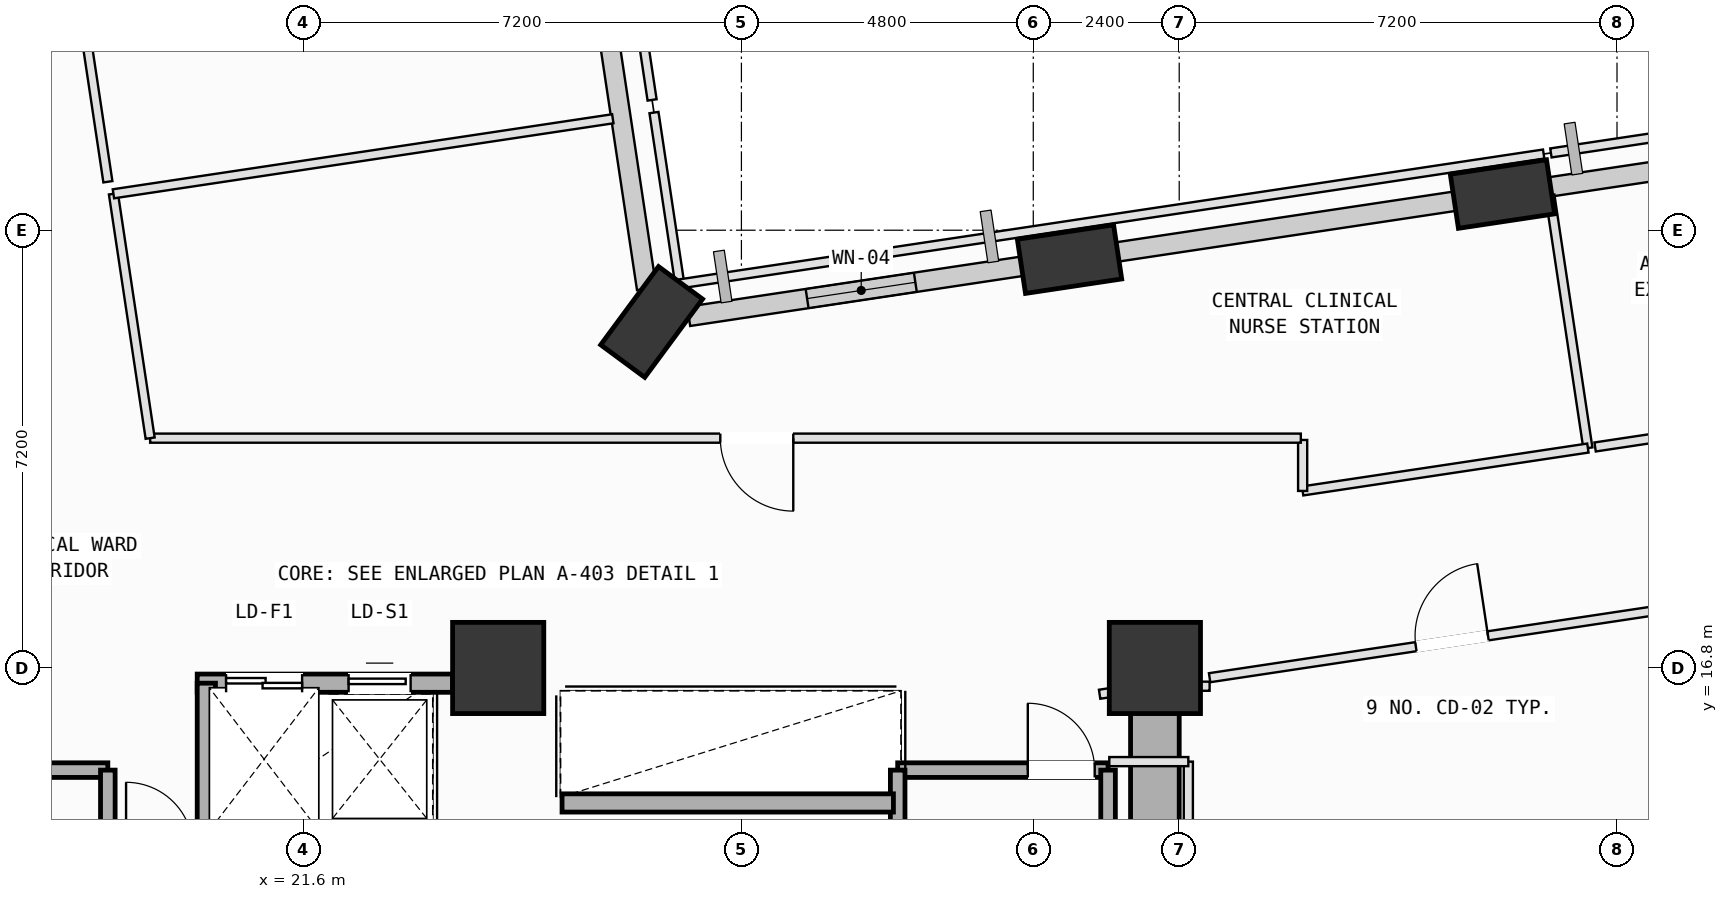
"""IFC4 building model, lengths in metres.
Left out: names, types, materials, properties, quantities, classifications, styles, units other than length and angle.
Written with IfcOpenShell. Run it as: python <this file> out.ifc"""

import sys

from ifc_helpers import new_model, si_unit, direction, frame, frame_2d, origin, origin_2d, place, context, subcontext, project, spatial, rectangle, extrude, element, fill, save


model = new_model("IFC4")
c1 = context("Model", 3, precision=1e-05, world=origin(), true_north=direction((0.0, 1.0)))
c2 = subcontext(c1, "Body", "Model", "MODEL_VIEW")
j1 = project(units=[si_unit("LENGTHUNIT", "METRE"), si_unit("PLANEANGLEUNIT", "RADIAN")], contexts=[c1])
p1 = place(None, origin())
s1 = spatial("IfcSite", under=j1, at=p1, CompositionType="ELEMENT")
p2 = place(p1, origin())
s2 = spatial("IfcBuilding", under=s1, at=p2, CompositionType="ELEMENT")
p3 = place(p2, frame((0.0, 0.0, 59.0)))
s3 = spatial("IfcBuildingStorey", under=s2, at=p3, CompositionType="ELEMENT", Elevation=59.0)
for number, where, z_axis, x_axis in (
    (1, (24.8, 16.8, 0.0), (0.0, 0.0, 1.0), (1.0, 0.0, 0.0)),
    (2, (35.6, 16.8, 0.0), (0.0, 0.0, 1.0), (1.0, 0.0, 0.0)),
):
    element("IfcColumn", number, at=place(p3, frame(where, z_axis=z_axis, x_axis=x_axis)), inside=s3, PredefinedType="COLUMN", context=c2, shape_type="SweptSolid", body=[
        extrude(rectangle(XDim=1.5, YDim=1.5, at=origin_2d()), origin(), (0.0, 0.0, 1.0), 4.0),
    ])
p4 = place(p3, frame((41.316, 24.595, 0.002), z_axis=(0.000610560717, 0.031993381587, 0.999487894249), x_axis=(-0.991541763684, -0.129700801912, 0.00475739999)))
e3 = element("IfcColumn", 3, at=p4, inside=s3, PredefinedType="COLUMN", context=c2, shape_type="SweptSolid", body=[
    extrude(rectangle(XDim=1.6, YDim=0.9, at=origin_2d()), origin(), (0.0, 0.0, 1.0), 3.999),
])
p5 = place(p3, frame((34.196, 23.524, 0.002), z_axis=(0.005253423551, 0.002504539135, 0.999983064269), x_axis=(-0.559757709656, 0.828655874178, 0.000865257922)))
e4 = element("IfcColumn", 4, at=p5, inside=s3, PredefinedType="COLUMN", context=c2, shape_type="SweptSolid", body=[
    extrude(rectangle(XDim=1.6, YDim=0.9, at=origin_2d()), origin(), (0.0, 0.0, 1.0), 3.997),
])
p6 = place(p3, frame((27.323, 22.491, 0.002), z_axis=(0.009770218113, -0.025952141862, 0.999615440642), x_axis=(0.272727110084, 0.961832825284, 0.022305596404)))
e5 = element("IfcColumn", 5, at=p6, inside=s3, PredefinedType="COLUMN", context=c2, shape_type="SweptSolid", body=[
    extrude(rectangle(XDim=1.6, YDim=0.9, at=origin_2d()), origin(), (0.0, 0.0, 1.0), 3.998),
])
p7 = place(p3, frame((41.925, 24.686, 0.0), z_axis=(0.0, 0.0, 1.0), x_axis=(0.988883458741, 0.148692652905, 0.0)))
e6 = element("IfcWall", 6, at=p7, inside=s3, PredefinedType="SOLIDWALL", context=c2, shape_type="SweptSolid", body=[
    extrude(rectangle(XDim=6.0, YDim=0.32, at=frame_2d((3.0, 0.0))), origin(), (0.0, 0.0, 1.0), 3.165),
])
p8 = place(p7, frame((2.238, 0.0, 0.75)))
e7 = element("IfcOpeningElement", 7, at=p8, cuts=e6, PredefinedType="OPENING", context=c2, shape_type="SweptSolid", body=[
    extrude(rectangle(XDim=2.0, YDim=1.95, at=frame_2d((1.0, 0.975))), frame((0.0, 0.17, 0.0), z_axis=(0.0, -1.0, 0.0), x_axis=(1.0, 0.0, 0.0)), (0.0, 0.0, 1.0), 0.34),
])
p9 = place(p3, frame((34.808, 23.616, 0.0), z_axis=(0.0, 0.0, 1.0), x_axis=(0.988886347304, 0.148673441189, 0.0)))
e8 = element("IfcWall", 8, at=p9, inside=s3, PredefinedType="SOLIDWALL", context=c2, shape_type="SweptSolid", body=[
    extrude(rectangle(XDim=5.987, YDim=0.32, at=frame_2d((2.994, 0.0))), origin(), (0.0, 0.0, 1.0), 3.165),
])
p10 = place(p3, frame((27.934, 22.583, 0.0), z_axis=(0.0, 0.0, 1.0), x_axis=(0.988887912661, 0.148663029005, 0.0)))
e9 = element("IfcWall", 9, at=p10, inside=s3, PredefinedType="SOLIDWALL", context=c2, shape_type="SweptSolid", body=[
    extrude(rectangle(XDim=5.736, YDim=0.32, at=frame_2d((2.868, 0.0))), origin(), (0.0, 0.0, 1.0), 3.165),
])
p11 = place(p10, frame((1.969, 0.0, 0.75)))
e10 = element("IfcOpeningElement", 10, at=p11, cuts=e9, PredefinedType="OPENING", context=c2, shape_type="SweptSolid", body=[
    extrude(rectangle(XDim=1.8, YDim=2.05, at=frame_2d((0.9, 1.025))), frame((0.0, 0.17, 0.0), z_axis=(0.0, -1.0, 0.0), x_axis=(1.0, 0.0, 0.0)), (0.0, 0.0, 1.0), 0.34),
])
p12 = place(p3, frame((27.241, 23.039, 0.0), z_axis=(0.0, 0.0, 1.0), x_axis=(-0.148660081435, 0.988888355775, 0.0)))
e11 = element("IfcWall", 11, at=p12, inside=s3, PredefinedType="SOLIDWALL", context=c2, shape_type="SweptSolid", body=[
    extrude(rectangle(XDim=6.536, YDim=0.32, at=frame_2d((3.268, 0.0))), origin(), (0.0, 0.0, 1.0), 3.165),
])
p13 = place(p3, frame((14.92, 15.12, 0.0), z_axis=(0.0, 0.0, 1.0), x_axis=(1.0, 0.0, 0.0)))
e12 = element("IfcWall", 12, at=p13, inside=s3, PredefinedType="SOLIDWALL", context=c2, shape_type="SweptSolid", body=[
    extrude(rectangle(XDim=3.46, YDim=0.24, at=frame_2d((1.73, 0.0))), origin(), (0.0, 0.0, 1.0), 3.78),
])
p14 = place(p13, frame((0.22, 0.0, 0.0)))
e13 = element("IfcOpeningElement", 13, at=p14, cuts=e12, PredefinedType="OPENING", context=c2, shape_type="SweptSolid", body=[
    extrude(rectangle(XDim=1.1, YDim=2.15, at=frame_2d((0.55, 1.075))), frame((0.0, 0.13, 0.0), z_axis=(0.0, -1.0, 0.0), x_axis=(1.0, 0.0, 0.0)), (0.0, 0.0, 1.0), 0.26),
])
p15 = place(p3, frame((18.38, 15.12, 0.0), z_axis=(0.0, 0.0, 1.0), x_axis=(0.0, -1.0, 0.0)))
e14 = element("IfcWall", 14, at=p15, inside=s3, PredefinedType="SOLIDWALL", context=c2, shape_type="SweptSolid", body=[
    extrude(rectangle(XDim=6.92, YDim=0.24, at=frame_2d((3.46, 0.0))), origin(), (0.0, 0.0, 1.0), 3.78),
])
p16 = place(p3, frame((31.37, 15.12, 0.0), z_axis=(0.0, 0.0, 1.0), x_axis=(1.0, 0.0, 0.0)))
e15 = element("IfcWall", 15, at=p16, inside=s3, PredefinedType="SOLIDWALL", context=c2, shape_type="SweptSolid", body=[
    extrude(rectangle(XDim=3.46, YDim=0.24, at=frame_2d((1.73, 0.0))), origin(), (0.0, 0.0, 1.0), 3.78),
])
p17 = place(p16, frame((2.14, 0.0, 0.0)))
e16 = element("IfcOpeningElement", 16, at=p17, cuts=e15, PredefinedType="OPENING", context=c2, shape_type="SweptSolid", body=[
    extrude(rectangle(XDim=1.1, YDim=2.15, at=frame_2d((0.55, 1.075))), frame((0.0, 0.13, 0.0), z_axis=(0.0, -1.0, 0.0), x_axis=(1.0, 0.0, 0.0)), (0.0, 0.0, 1.0), 0.26),
])
for number, where, z_axis, x_axis in (
    (17, (34.83, 15.12, 0.0), (0.0, 0.0, 1.0), (0.0, -1.0, 0.0)),
    (18, (31.37, 8.2, 0.0), (0.0, 0.0, 1.0), (0.0, 1.0, 0.0)),
):
    element("IfcWall", number, at=place(p3, frame(where, z_axis=z_axis, x_axis=x_axis)), inside=s3, PredefinedType="SOLIDWALL", context=c2, shape_type="SweptSolid", body=[
        extrude(rectangle(XDim=6.92, YDim=0.24, at=frame_2d((3.46, 0.0))), origin(), (0.0, 0.0, 1.0), 3.78),
    ])
p18 = place(p3, frame((35.6, 7.8, 0.0), z_axis=(0.0, 0.0, 1.0), x_axis=(0.0, 1.0, 0.0)))
e19 = element("IfcWall", 19, at=p18, inside=s3, PredefinedType="SHEAR", context=c2, shape_type="SweptSolid", body=[
    extrude(rectangle(XDim=9.0, YDim=0.8, at=frame_2d((4.5, 0.0))), origin(), (0.0, 0.0, 1.0), 3.78),
])
p19 = place(p3, frame((19.85, 16.55, 0.0), z_axis=(0.0, 0.0, 1.0), x_axis=(1.0, 0.0, 0.0)))
e20 = element("IfcWall", 20, at=p19, inside=s3, PredefinedType="SOLIDWALL", context=c2, shape_type="SweptSolid", body=[
    extrude(rectangle(XDim=4.2, YDim=0.3, at=frame_2d((2.1, 0.0))), origin(), (0.0, 0.0, 1.0), 3.78),
])
p20 = place(p19, frame((0.475, 0.0, 0.0)))
e21 = element("IfcOpeningElement", 21, at=p20, cuts=e20, PredefinedType="OPENING", context=c2, shape_type="SweptSolid", body=[
    extrude(rectangle(XDim=1.25, YDim=2.18, at=frame_2d((0.625, 1.09))), frame((0.0, 0.16, 0.0), z_axis=(0.0, -1.0, 0.0), x_axis=(1.0, 0.0, 0.0)), (0.0, 0.0, 1.0), 0.32),
])
p21 = place(p19, frame((2.49, 0.0, 0.0)))
e22 = element("IfcOpeningElement", 22, at=p21, cuts=e20, PredefinedType="OPENING", context=c2, shape_type="SweptSolid", body=[
    extrude(rectangle(XDim=1.02, YDim=2.12, at=frame_2d((0.51, 1.06))), frame((0.0, 0.16, 0.0), z_axis=(0.0, -1.0, 0.0), x_axis=(1.0, 0.0, 0.0)), (0.0, 0.0, 1.0), 0.32),
])
p22 = place(p3, frame((20.0, 13.82, 0.0), z_axis=(0.0, 0.0, 1.0), x_axis=(0.0, 1.0, 0.0)))
e23 = element("IfcWall", 23, at=p22, inside=s3, PredefinedType="SOLIDWALL", context=c2, shape_type="SweptSolid", body=[
    extrude(rectangle(XDim=2.73, YDim=0.3, at=frame_2d((1.365, 0.0))), origin(), (0.0, 0.0, 1.0), 3.78),
])
p23 = place(p3, frame((25.85, 14.58, 0.0), z_axis=(0.0, 0.0, 1.0), x_axis=(1.0, 0.0, 0.0)))
e24 = element("IfcWall", 24, at=p23, inside=s3, PredefinedType="SOLIDWALL", context=c2, shape_type="SweptSolid", body=[
    extrude(rectangle(XDim=5.45, YDim=0.3, at=frame_2d((2.725, 0.0))), origin(), (0.0, 0.0, 1.0), 3.78),
])
p24 = place(p3, frame((36.15, 7.5, 0.0), z_axis=(0.0, 0.0, 1.0), x_axis=(0.0, 1.0, 0.0)))
e25 = element("IfcWall", 25, at=p24, inside=s3, PredefinedType="PARTITIONING", context=c2, shape_type="SweptSolid", body=[
    extrude(rectangle(XDim=7.76, YDim=0.15, at=frame_2d((3.88, 0.0))), origin(), (0.0, 0.0, 1.0), 3.78),
])
p25 = place(p3, frame((36.15, 15.26, 0.0), z_axis=(0.0, 0.0, 1.0), x_axis=(-1.0, 0.0, 0.0)))
e26 = element("IfcWall", 26, at=p25, inside=s3, PredefinedType="PARTITIONING", context=c2, shape_type="SweptSolid", body=[
    extrude(rectangle(XDim=1.3, YDim=0.15, at=frame_2d((0.65, 0.0))), origin(), (0.0, 0.0, 1.0), 3.78),
])
p26 = place(p3, frame((34.691, 16.368, 0.0), z_axis=(0.0, 0.0, 1.0), x_axis=(0.988798318439, 0.149257781885, 0.0)))
e27 = element("IfcWall", 27, at=p26, inside=s3, PredefinedType="PARTITIONING", context=c2, shape_type="SweptSolid", body=[
    extrude(rectangle(XDim=0.885, YDim=0.15, at=frame_2d((0.442, 0.0))), origin(), (0.0, 0.0, 1.0), 2.865),
])
p27 = place(p3, frame((35.566, 16.5, 0.0), z_axis=(0.0, 0.0, 1.0), x_axis=(1.0, 0.0, 0.0)))
e28 = element("IfcWall", 28, at=p27, inside=s3, PredefinedType="PARTITIONING", context=c2, shape_type="SweptSolid", body=[
    extrude(rectangle(XDim=0.934, YDim=0.15, at=frame_2d((0.467, 0.0))), origin(), (0.0, 0.0, 1.0), 2.865),
])
p28 = place(p3, frame((36.5, 16.64, 0.0), z_axis=(0.0, 0.0, 1.0), x_axis=(0.988871164491, 0.148774393089, 0.0)))
e29 = element("IfcWall", 29, at=p28, inside=s3, PredefinedType="PARTITIONING", context=c2, shape_type="SweptSolid", body=[
    extrude(rectangle(XDim=8.061, YDim=0.15, at=frame_2d((4.03, 0.0))), origin(), (0.0, 0.0, 1.0), 3.78),
])
p29 = place(p28, frame((3.43, 0.0, 0.0)))
e30 = element("IfcOpeningElement", 30, at=p29, cuts=e29, PredefinedType="OPENING", context=c2, shape_type="SweptSolid", body=[
    extrude(rectangle(XDim=1.2, YDim=2.15, at=frame_2d((0.6, 1.075))), frame((0.0, 0.085, 0.0), z_axis=(0.0, -1.0, 0.0), x_axis=(1.0, 0.0, 0.0)), (0.0, 0.0, 1.0), 0.17),
])
p30 = place(p3, frame((42.096, 24.576, 0.0), z_axis=(0.0, 0.0, 1.0), x_axis=(0.148610121191, -0.988895865033, 0.0)))
e31 = element("IfcWall", 31, at=p30, inside=s3, PredefinedType="PARTITIONING", context=c2, shape_type="SweptSolid", body=[
    extrude(rectangle(XDim=4.206, YDim=0.15, at=frame_2d((2.103, 0.0))), origin(), (0.0, 0.0, 1.0), 3.78),
])
p31 = place(p3, frame((42.721, 20.417, 0.0), z_axis=(0.0, 0.0, 1.0), x_axis=(-0.988891762051, -0.148637421089, 0.0)))
e32 = element("IfcWall", 32, at=p31, inside=s3, PredefinedType="PARTITIONING", context=c2, shape_type="SweptSolid", body=[
    extrude(rectangle(XDim=4.744, YDim=0.15, at=frame_2d((2.372, 0.0))), origin(), (0.0, 0.0, 1.0), 3.78),
])
p32 = place(p3, frame((38.03, 19.712, 0.0), z_axis=(0.0, 0.0, 1.0), x_axis=(0.0, 1.0, 0.0)))
e33 = element("IfcWall", 33, at=p32, inside=s3, PredefinedType="PARTITIONING", context=c2, shape_type="SweptSolid", body=[
    extrude(rectangle(XDim=0.838, YDim=0.15, at=frame_2d((0.419, 0.0))), origin(), (0.0, 0.0, 1.0), 3.78),
])
p33 = place(p3, frame((38.0, 20.58, 0.0), z_axis=(0.0, 0.0, 1.0), x_axis=(-1.0, 0.0, 0.0)))
e34 = element("IfcWall", 34, at=p33, inside=s3, PredefinedType="PARTITIONING", context=c2, shape_type="SweptSolid", body=[
    extrude(rectangle(XDim=18.924, YDim=0.15, at=frame_2d((9.462, 0.0))), origin(), (0.0, 0.0, 1.0), 3.365),
])
p34 = place(p33, frame((8.347, 0.0, 0.0)))
e35 = element("IfcOpeningElement", 35, at=p34, cuts=e34, PredefinedType="OPENING", context=c2, shape_type="SweptSolid", body=[
    extrude(rectangle(XDim=1.2, YDim=2.15, at=frame_2d((0.6, 1.075))), frame((0.0, 0.085, 0.0), z_axis=(0.0, -1.0, 0.0), x_axis=(1.0, 0.0, 0.0)), (0.0, 0.0, 1.0), 0.17),
])
p35 = place(p3, frame((19.076, 20.58, 0.0), z_axis=(0.0, 0.0, 1.0), x_axis=(-0.148616569828, 0.988894895918, 0.0)))
e36 = element("IfcWall", 36, at=p35, inside=s3, PredefinedType="PARTITIONING", context=c2, shape_type="SweptSolid", body=[
    extrude(rectangle(XDim=4.064, YDim=0.15, at=frame_2d((2.032, 0.0))), origin(), (0.0, 0.0, 1.0), 3.78),
])
p36 = place(p3, frame((18.472, 24.599, 0.0), z_axis=(0.0, 0.0, 1.0), x_axis=(0.988902475287, 0.148566127942, 0.0)))
e37 = element("IfcWall", 37, at=p36, inside=s3, PredefinedType="PARTITIONING", context=c2, shape_type="SweptSolid", body=[
    extrude(rectangle(XDim=8.305, YDim=0.15, at=frame_2d((4.153, 0.0))), origin(), (0.0, 0.0, 1.0), 3.78),
])
p37 = place(p3, frame((27.362, 25.935, 0.0), z_axis=(0.0, 0.0, 1.0), x_axis=(0.148721659191, -0.9888790968, 0.0)))
e38 = element("IfcWall", 38, at=p37, inside=s3, PredefinedType="PARTITIONING", context=c2, shape_type="SweptSolid", body=[
    extrude(rectangle(XDim=2.85, YDim=0.15, at=frame_2d((1.425, 0.0))), origin(), (0.0, 0.0, 1.0), 3.78),
])
p38 = place(p3, frame((27.786, 23.117, 0.0), z_axis=(0.0, 0.0, 1.0), x_axis=(0.988887440996, 0.148666166425, 0.0)))
e39 = element("IfcWall", 39, at=p38, inside=s3, PredefinedType="PARTITIONING", context=c2, shape_type="SweptSolid", body=[
    extrude(rectangle(XDim=14.368, YDim=0.15, at=frame_2d((7.184, 0.0))), origin(), (0.0, 0.0, 1.0), 3.165),
])
p39 = place(p3, frame((63.01, 23.467, 0.0), z_axis=(0.0, 0.0, 1.0), x_axis=(-0.988889595635, -0.148651833642, 0.0)))
e40 = element("IfcWall", 40, at=p39, inside=s3, PredefinedType="PARTITIONING", context=c2, shape_type="SweptSolid", body=[
    extrude(rectangle(XDim=20.396, YDim=0.15, at=frame_2d((10.198, 0.0))), origin(), (0.0, 0.0, 1.0), 3.78),
])
p40 = place(p39, frame((9.598, 0.0, 0.0)))
e41 = element("IfcOpeningElement", 41, at=p40, cuts=e40, PredefinedType="OPENING", context=c2, shape_type="SweptSolid", body=[
    extrude(rectangle(XDim=1.2, YDim=2.15, at=frame_2d((0.6, 1.075))), frame((0.0, 0.085, 0.0), z_axis=(0.0, -1.0, 0.0), x_axis=(1.0, 0.0, 0.0)), (0.0, 0.0, 1.0), 0.17),
])
p41 = place(p3, frame((42.113, 25.271, 0.0), z_axis=(0.0, 0.0, 1.0), x_axis=(0.988884883035, 0.148683180302, 0.0)))
e42 = element("IfcWall", 42, at=p41, inside=s3, PredefinedType="PARTITIONING", context=c2, shape_type="SweptSolid", body=[
    extrude(rectangle(XDim=20.412, YDim=0.15, at=frame_2d((10.206, 0.0))), origin(), (0.0, 0.0, 1.0), 3.165),
])
p42 = place(p3, frame((18.381, 24.797, 0.0), z_axis=(0.0, 0.0, 1.0), x_axis=(-0.148671093469, 0.988886700268, 0.0)))
e43 = element("IfcWall", 43, at=p42, inside=s3, PredefinedType="PARTITIONING", context=c2, shape_type="SweptSolid", body=[
    extrude(rectangle(XDim=8.341, YDim=0.15, at=frame_2d((4.17, 0.0))), origin(), (0.0, 0.0, 1.0), 3.78),
])
p43 = place(p42, frame((3.57, 0.0, 0.0)))
e44 = element("IfcOpeningElement", 44, at=p43, cuts=e43, PredefinedType="OPENING", context=c2, shape_type="SweptSolid", body=[
    extrude(rectangle(XDim=1.2, YDim=2.15, at=frame_2d((0.6, 1.075))), frame((0.0, 0.085, 0.0), z_axis=(0.0, -1.0, 0.0), x_axis=(1.0, 0.0, 0.0)), (0.0, 0.0, 1.0), 0.17),
])
p44 = place(p3, frame((26.091, 34.39, 0.0), z_axis=(0.0, 0.0, 1.0), x_axis=(0.148688309423, -0.988884111836, 0.0)))
e45 = element("IfcWall", 45, at=p44, inside=s3, PredefinedType="PARTITIONING", context=c2, shape_type="SweptSolid", body=[
    extrude(rectangle(XDim=8.34, YDim=0.15, at=frame_2d((4.17, 0.0))), origin(), (0.0, 0.0, 1.0), 3.78),
])
p45 = place(p11, origin())
e46 = element("IfcWindow", 46, at=p45, inside=s3, PartitioningType="SINGLE_PANEL", PredefinedType="WINDOW", context=c2, shape_type="SweptSolid", body=[
    extrude(rectangle(XDim=1.8, YDim=2.05, at=frame_2d((0.9, 1.025))), frame((0.0, 0.03, 0.0), z_axis=(0.0, -1.0, 0.0), x_axis=(1.0, 0.0, 0.0)), (0.0, 0.0, 1.0), 0.06),
])
fill(e10, e46)
p46 = place(p17, origin())
e47 = element("IfcDoor", 47, at=p46, inside=s3, OperationType="SINGLE_SWING_LEFT", PredefinedType="DOOR", context=c2, shape_type="SweptSolid", body=[
    extrude(rectangle(XDim=1.1, YDim=2.15, at=frame_2d((0.55, 1.075))), frame((0.0, 0.025, 0.0), z_axis=(0.0, -1.0, 0.0), x_axis=(1.0, 0.0, 0.0)), (0.0, 0.0, 1.0), 0.05),
])
fill(e16, e47)
p47 = place(p20, origin())
e48 = element("IfcDoor", 48, at=p47, inside=s3, OperationType="DOUBLE_DOOR_SLIDING", PredefinedType="DOOR", context=c2, shape_type="SweptSolid", body=[
    extrude(rectangle(XDim=1.25, YDim=2.18, at=frame_2d((0.625, 1.09))), frame((0.0, 0.025, 0.0), z_axis=(0.0, -1.0, 0.0), x_axis=(1.0, 0.0, 0.0)), (0.0, 0.0, 1.0), 0.05),
])
fill(e21, e48)
p48 = place(p21, origin())
e49 = element("IfcDoor", 49, at=p48, inside=s3, OperationType="SLIDING_TO_LEFT", PredefinedType="DOOR", context=c2, shape_type="SweptSolid", body=[
    extrude(rectangle(XDim=1.02, YDim=2.12, at=frame_2d((0.51, 1.06))), frame((0.0, 0.025, 0.0), z_axis=(0.0, -1.0, 0.0), x_axis=(1.0, 0.0, 0.0)), (0.0, 0.0, 1.0), 0.05),
])
fill(e22, e49)
p49 = place(p29, origin())
e50 = element("IfcDoor", 50, at=p49, inside=s3, OperationType="SINGLE_SWING_RIGHT", PredefinedType="DOOR", context=c2, shape_type="SweptSolid", body=[
    extrude(rectangle(XDim=1.2, YDim=2.15, at=frame_2d((0.6, 1.075))), frame((0.0, 0.025, 0.0), z_axis=(0.0, -1.0, 0.0), x_axis=(1.0, 0.0, 0.0)), (0.0, 0.0, 1.0), 0.05),
])
fill(e30, e50)
p50 = place(p34, origin())
e51 = element("IfcDoor", 51, at=p50, inside=s3, OperationType="SINGLE_SWING_LEFT", PredefinedType="DOOR", context=c2, shape_type="SweptSolid", body=[
    extrude(rectangle(XDim=1.2, YDim=2.15, at=frame_2d((0.6, 1.075))), frame((0.0, 0.025, 0.0), z_axis=(0.0, -1.0, 0.0), x_axis=(1.0, 0.0, 0.0)), (0.0, 0.0, 1.0), 0.05),
])
fill(e35, e51)
save(model, sys.argv[1])
